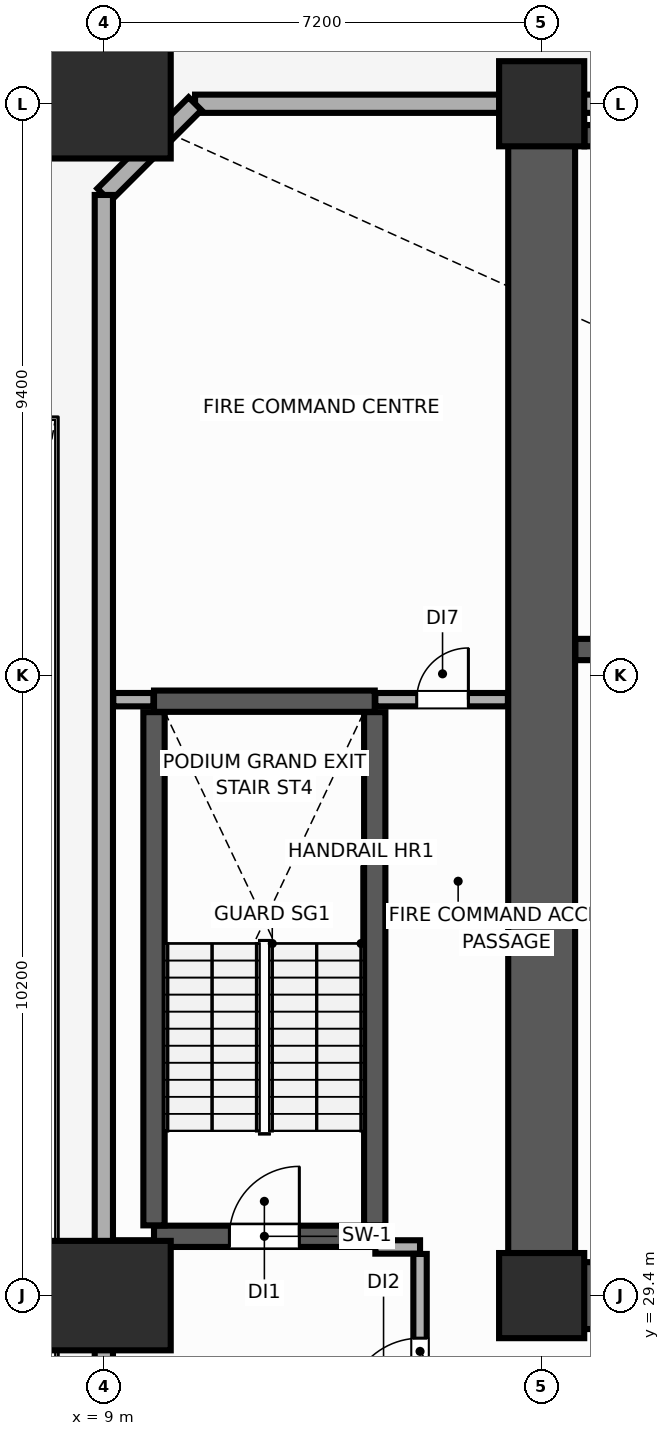
"""IFC4 building model, lengths in metres.
Left out: names, types, materials, properties, quantities, classifications, styles, units other than length and angle.
Written with IfcOpenShell. Run it as: python <this file> out.ifc"""

import sys

from ifc_helpers import new_model, si_unit, direction, frame, frame_2d, origin, origin_2d, place, context, subcontext, project, spatial, rectangle, extrude, element, fill, save


model = new_model("IFC4")
c1 = context("Model", 3, precision=1e-05, world=origin(), true_north=direction((0.0, 1.0)))
c2 = subcontext(c1, "Body", "Model", "MODEL_VIEW")
j1 = project(units=[si_unit("LENGTHUNIT", "METRE"), si_unit("PLANEANGLEUNIT", "RADIAN")], contexts=[c1])
p1 = place(None, origin())
s1 = spatial("IfcSite", under=j1, at=p1, CompositionType="ELEMENT")
p2 = place(p1, origin())
s2 = spatial("IfcBuilding", under=s1, at=p2, CompositionType="ELEMENT")
p3 = place(p2, origin())
s3 = spatial("IfcBuildingStorey", under=s2, at=p3, CompositionType="ELEMENT", Elevation=0.0)
for number, where, z_axis, x_axis in (
    (1, (9.0, 29.4, 0.0), (0.0, 0.0, 1.0), (1.0, 0.0, 0.0)),
    (2, (9.0, 49.0, 0.0), (0.0, 0.0, 1.0), (1.0, 0.0, 0.0)),
):
    element("IfcColumn", number, at=place(p3, frame(where, z_axis=z_axis, x_axis=x_axis)), inside=s3, PredefinedType="USERDEFINED", context=c2, shape_type="SweptSolid", body=[
        extrude(rectangle(XDim=2.2, YDim=1.8, at=origin_2d()), origin(), (0.0, 0.0, 1.0), 7.68),
    ])
for number, where, z_axis, x_axis in (
    (3, (16.2, 29.4, 0.0), (0.0, 0.0, 1.0), (1.0, 0.0, 0.0)),
    (4, (16.2, 49.0, 0.0), (0.0, 0.0, 1.0), (1.0, 0.0, 0.0)),
):
    element("IfcColumn", number, at=place(p3, frame(where, z_axis=z_axis, x_axis=x_axis)), inside=s3, PredefinedType="COLUMN", context=c2, shape_type="SweptSolid", body=[
        extrude(rectangle(XDim=1.4, YDim=1.4, at=origin_2d()), origin(), (0.0, 0.0, 1.0), 7.68),
    ])
p4 = place(p3, frame((73.5, 49.0, 0.0), z_axis=(0.0, 0.0, 1.0), x_axis=(-1.0, 0.0, 0.0)))
e5 = element("IfcWall", 5, at=p4, inside=s3, PredefinedType="SOLIDWALL", context=c2, shape_type="SweptSolid", body=[
    extrude(rectangle(XDim=63.0, YDim=0.3, at=frame_2d((31.5, 0.0))), origin(), (0.0, 0.0, 1.0), 5.4),
])
p5 = place(p4, frame((46.15, 0.0, 0.0)))
e6 = element("IfcOpeningElement", 6, at=p5, cuts=e5, PredefinedType="OPENING", context=c2, shape_type="SweptSolid", body=[
    extrude(rectangle(XDim=2.0, YDim=2.4, at=frame_2d((1.0, 1.2))), frame((0.0, 0.16, 0.0), z_axis=(0.0, -1.0, 0.0), x_axis=(1.0, 0.0, 0.0)), (0.0, 0.0, 1.0), 0.32),
])
p6 = place(p4, frame((37.6, 0.0, 0.0)))
e7 = element("IfcOpeningElement", 7, at=p6, cuts=e5, PredefinedType="OPENING", context=c2, shape_type="SweptSolid", body=[
    extrude(rectangle(XDim=2.0, YDim=2.4, at=frame_2d((1.0, 1.2))), frame((0.0, 0.16, 0.0), z_axis=(0.0, -1.0, 0.0), x_axis=(1.0, 0.0, 0.0)), (0.0, 0.0, 1.0), 0.32),
])
p7 = place(p4, frame((16.65, 0.0, 0.0)))
e8 = element("IfcOpeningElement", 8, at=p7, cuts=e5, PredefinedType="OPENING", context=c2, shape_type="SweptSolid", body=[
    extrude(rectangle(XDim=2.0, YDim=2.4, at=frame_2d((1.0, 1.2))), frame((0.0, 0.16, 0.0), z_axis=(0.0, -1.0, 0.0), x_axis=(1.0, 0.0, 0.0)), (0.0, 0.0, 1.0), 0.32),
])
p8 = place(p3, frame((10.5, 49.0, 0.0), z_axis=(0.0, 0.0, 1.0), x_axis=(-0.707106781187, -0.707106781187, 0.0)))
e9 = element("IfcWall", 9, at=p8, inside=s3, PredefinedType="SOLIDWALL", context=c2, shape_type="SweptSolid", body=[
    extrude(rectangle(XDim=2.121, YDim=0.3, at=frame_2d((1.061, 0.0))), origin(), (0.0, 0.0, 1.0), 7.68),
])
p9 = place(p3, frame((9.0, 47.5, 0.0), z_axis=(0.0, 0.0, 1.0), x_axis=(0.0, -1.0, 0.0)))
e10 = element("IfcWall", 10, at=p9, inside=s3, PredefinedType="SOLIDWALL", context=c2, shape_type="SweptSolid", body=[
    extrude(rectangle(XDim=26.8, YDim=0.3, at=frame_2d((13.4, 0.0))), origin(), (0.0, 0.0, 1.0), 5.4),
])
p10 = place(p3, frame((16.2, 29.4, 0.0), z_axis=(0.0, 0.0, 1.0), x_axis=(0.0, 1.0, 0.0)))
e11 = element("IfcWall", 11, at=p10, inside=s3, PredefinedType="SHEAR", context=c2, shape_type="SweptSolid", body=[
    extrude(rectangle(XDim=19.2, YDim=1.1, at=frame_2d((9.6, 0.0))), origin(), (0.0, 0.0, 1.0), 7.68),
])
p11 = place(p3, frame((16.755, 29.4, 0.0), z_axis=(0.0, 0.0, 1.0), x_axis=(1.0, 0.0, 0.0)))
e12 = element("IfcWall", 12, at=p11, inside=s3, PredefinedType="SHEAR", context=c2, shape_type="SweptSolid", body=[
    extrude(rectangle(XDim=6.845, YDim=1.1, at=frame_2d((3.423, 0.0))), origin(), (0.0, 0.0, 1.0), 7.68),
])
p12 = place(p3, frame((16.755, 40.025, 0.0), z_axis=(0.0, 0.0, 1.0), x_axis=(1.0, 0.0, 0.0)))
e13 = element("IfcWall", 13, at=p12, inside=s3, PredefinedType="SHEAR", context=c2, shape_type="SweptSolid", body=[
    extrude(rectangle(XDim=4.1, YDim=0.35, at=frame_2d((2.05, 0.0))), origin(), (0.0, 0.0, 1.0), 7.68),
])
p13 = place(p12, frame((1.71, 0.0, 0.0)))
e14 = element("IfcOpeningElement", 14, at=p13, cuts=e13, PredefinedType="OPENING", context=c2, shape_type="SweptSolid", body=[
    extrude(rectangle(XDim=1.15, YDim=2.15, at=frame_2d((0.575, 1.075))), frame((0.0, 0.185, 0.0), z_axis=(0.0, -1.0, 0.0), x_axis=(1.0, 0.0, 0.0)), (0.0, 0.0, 1.0), 0.37),
])
p14 = place(p3, frame((16.905, 48.475, 0.0), z_axis=(0.0, 0.0, 1.0), x_axis=(1.0, 0.0, 0.0)))
e15 = element("IfcWall", 15, at=p14, inside=s3, PredefinedType="SHEAR", context=c2, shape_type="SweptSolid", body=[
    extrude(rectangle(XDim=3.95, YDim=0.35, at=frame_2d((1.975, 0.0))), origin(), (0.0, 0.0, 1.0), 7.68),
])
p15 = place(p3, frame((9.825, 30.375, 0.0), z_axis=(0.0, 0.0, 1.0), x_axis=(1.0, 0.0, 0.0)))
e16 = element("IfcWall", 16, at=p15, inside=s3, PredefinedType="SHEAR", context=c2, shape_type="SweptSolid", body=[
    extrude(rectangle(XDim=3.63, YDim=0.35, at=frame_2d((1.815, 0.0))), origin(), (0.0, 0.0, 1.0), 7.68),
])
p16 = place(p15, frame((1.24, 0.0, 0.0)))
e17 = element("IfcOpeningElement", 17, at=p16, cuts=e16, PredefinedType="OPENING", context=c2, shape_type="SweptSolid", body=[
    extrude(rectangle(XDim=1.15, YDim=2.15, at=frame_2d((0.575, 1.075))), frame((0.0, 0.185, 0.0), z_axis=(0.0, -1.0, 0.0), x_axis=(1.0, 0.0, 0.0)), (0.0, 0.0, 1.0), 0.37),
])
p17 = place(p3, frame((9.825, 39.175, 0.0), z_axis=(0.0, 0.0, 1.0), x_axis=(1.0, 0.0, 0.0)))
e18 = element("IfcWall", 18, at=p17, inside=s3, PredefinedType="SHEAR", context=c2, shape_type="SweptSolid", body=[
    extrude(rectangle(XDim=3.63, YDim=0.35, at=frame_2d((1.815, 0.0))), origin(), (0.0, 0.0, 1.0), 7.68),
])
for number, where, z_axis, x_axis in (
    (19, (9.825, 30.555, 0.0), (0.0, 0.0, 1.0), (0.0, 1.0, 0.0)),
    (20, (13.455, 30.555, 0.0), (0.0, 0.0, 1.0), (0.0, 1.0, 0.0)),
):
    element("IfcWall", number, at=place(p3, frame(where, z_axis=z_axis, x_axis=x_axis)), inside=s3, PredefinedType="SHEAR", context=c2, shape_type="SweptSolid", body=[
        extrude(rectangle(XDim=8.44, YDim=0.35, at=frame_2d((4.22, 0.0))), origin(), (0.0, 0.0, 1.0), 7.68),
    ])
p18 = place(p3, frame((9.155, 30.2, 0.0), z_axis=(0.0, 0.0, 1.0), x_axis=(1.0, 0.0, 0.0)))
e21 = element("IfcWall", 21, at=p18, inside=s3, PredefinedType="PARTITIONING", context=c2, shape_type="SweptSolid", body=[
    extrude(rectangle(XDim=0.66, YDim=0.22, at=frame_2d((0.33, 0.0))), origin(), (0.0, 0.0, 1.0), 7.68),
])
p19 = place(p3, frame((13.465, 30.2, 0.0), z_axis=(0.0, 0.0, 1.0), x_axis=(1.0, 0.0, 0.0)))
e22 = element("IfcWall", 22, at=p19, inside=s3, PredefinedType="PARTITIONING", context=c2, shape_type="SweptSolid", body=[
    extrude(rectangle(XDim=0.735, YDim=0.22, at=frame_2d((0.367, 0.0))), origin(), (0.0, 0.0, 1.0), 5.4),
])
p20 = place(p3, frame((14.2, 26.88, 0.0), z_axis=(0.0, 0.0, 1.0), x_axis=(0.0, 1.0, 0.0)))
e23 = element("IfcWall", 23, at=p20, inside=s3, PredefinedType="PARTITIONING", context=c2, shape_type="SweptSolid", body=[
    extrude(rectangle(XDim=3.205, YDim=0.22, at=frame_2d((1.603, 0.0))), origin(), (0.0, 0.0, 1.0), 7.68),
])
p21 = place(p20, frame((0.62, 0.0, 0.0)))
e24 = element("IfcOpeningElement", 24, at=p21, cuts=e23, PredefinedType="OPENING", context=c2, shape_type="SweptSolid", body=[
    extrude(rectangle(XDim=1.2, YDim=2.15, at=frame_2d((0.6, 1.075))), frame((0.0, 0.12, 0.0), z_axis=(0.0, -1.0, 0.0), x_axis=(1.0, 0.0, 0.0)), (0.0, 0.0, 1.0), 0.24),
])
p22 = place(p3, frame((9.155, 39.2, 0.0), z_axis=(0.0, 0.0, 1.0), x_axis=(1.0, 0.0, 0.0)))
e25 = element("IfcWall", 25, at=p22, inside=s3, PredefinedType="PARTITIONING", context=c2, shape_type="SweptSolid", body=[
    extrude(rectangle(XDim=0.66, YDim=0.22, at=frame_2d((0.33, 0.0))), origin(), (0.0, 0.0, 1.0), 7.68),
])
p23 = place(p3, frame((13.465, 39.2, 0.0), z_axis=(0.0, 0.0, 1.0), x_axis=(1.0, 0.0, 0.0)))
e26 = element("IfcWall", 26, at=p23, inside=s3, PredefinedType="PARTITIONING", context=c2, shape_type="SweptSolid", body=[
    extrude(rectangle(XDim=2.18, YDim=0.22, at=frame_2d((1.09, 0.0))), origin(), (0.0, 0.0, 1.0), 7.68),
])
p24 = place(p23, frame((0.68, 0.0, 0.0)))
e27 = element("IfcOpeningElement", 27, at=p24, cuts=e26, PredefinedType="OPENING", context=c2, shape_type="SweptSolid", body=[
    extrude(rectangle(XDim=0.85, YDim=2.1, at=frame_2d((0.425, 1.05))), frame((0.0, 0.12, 0.0), z_axis=(0.0, -1.0, 0.0), x_axis=(1.0, 0.0, 0.0)), (0.0, 0.0, 1.0), 0.24),
])
p25 = place(p16, origin())
e28 = element("IfcDoor", 28, at=p25, inside=s3, OperationType="SINGLE_SWING_RIGHT", PredefinedType="DOOR", context=c2, shape_type="SweptSolid", body=[
    extrude(rectangle(XDim=1.15, YDim=2.15, at=frame_2d((0.575, 1.075))), frame((0.0, 0.025, 0.0), z_axis=(0.0, -1.0, 0.0), x_axis=(1.0, 0.0, 0.0)), (0.0, 0.0, 1.0), 0.05),
])
fill(e17, e28)
p26 = place(p21, origin())
e29 = element("IfcDoor", 29, at=p26, inside=s3, OperationType="SINGLE_SWING_LEFT", PredefinedType="DOOR", context=c2, shape_type="SweptSolid", body=[
    extrude(rectangle(XDim=1.2, YDim=2.15, at=frame_2d((0.6, 1.075))), frame((0.0, 0.025, 0.0), z_axis=(0.0, -1.0, 0.0), x_axis=(1.0, 0.0, 0.0)), (0.0, 0.0, 1.0), 0.05),
])
fill(e24, e29)
p27 = place(p24, origin())
e30 = element("IfcDoor", 30, at=p27, inside=s3, OperationType="SINGLE_SWING_RIGHT", PredefinedType="DOOR", context=c2, shape_type="SweptSolid", body=[
    extrude(rectangle(XDim=0.85, YDim=2.1, at=frame_2d((0.425, 1.05))), frame((0.0, 0.025, 0.0), z_axis=(0.0, -1.0, 0.0), x_axis=(1.0, 0.0, 0.0)), (0.0, 0.0, 1.0), 0.05),
])
fill(e27, e30)
save(model, sys.argv[1])
